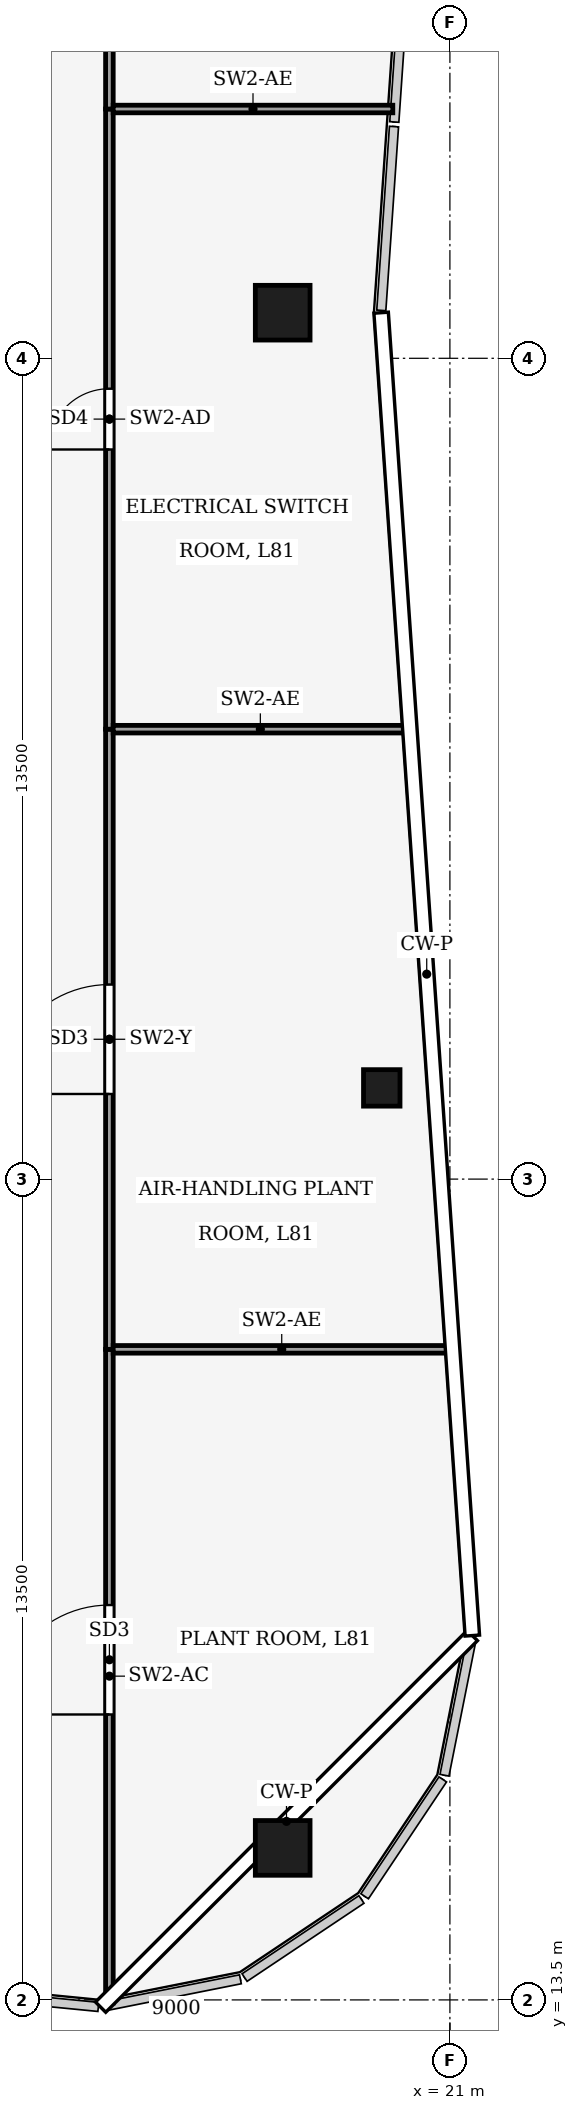
"""IFC4 building model, lengths in metres.
Left out: names, types, materials, properties, quantities, classifications, styles, units other than length and angle.
Written with IfcOpenShell. Run it as: python <this file> out.ifc"""

import sys

from ifc_helpers import new_model, si_unit, direction, frame, frame_2d, origin, origin_2d, place, context, subcontext, project, spatial, rectangle, hollow_rectangle, extrude, element, fill, save


model = new_model("IFC4")
c1 = context("Model", 3, precision=1e-05, world=origin(), true_north=direction((0.0, 1.0)))
c2 = subcontext(c1, "Body", "Model", "MODEL_VIEW")
j1 = project(units=[si_unit("LENGTHUNIT", "METRE"), si_unit("PLANEANGLEUNIT", "RADIAN")], contexts=[c1])
p1 = place(None, origin())
s1 = spatial("IfcSite", under=j1, at=p1, CompositionType="ELEMENT")
p2 = place(p1, origin())
s2 = spatial("IfcBuilding", under=s1, at=p2, CompositionType="ELEMENT")
p3 = place(p2, frame((0.0, 0.0, 359.5)))
s3 = spatial("IfcBuildingStorey", under=s2, at=p3, CompositionType="ELEMENT", Elevation=359.5)
for number, where, z_axis, x_axis in (
    (1, (18.25, 41.25, 0.0), (0.0, 0.0, 1.0), (1.0, 0.0, 0.0)),
    (2, (18.25, 16.0, 0.0), (0.0, 0.0, 1.0), (1.0, 0.0, 0.0)),
):
    element("IfcColumn", number, at=place(p3, frame(where, z_axis=z_axis, x_axis=x_axis)), inside=s3, PredefinedType="COLUMN", context=c2, shape_type="SweptSolid", body=[
        extrude(hollow_rectangle(XDim=0.9, YDim=0.9, WallThickness=0.04, at=origin_2d()), origin(), (0.0, 0.0, 1.0), 4.5),
    ])
p4 = place(p3, frame((19.879, 28.5, 0.0), z_axis=(0.0, 0.0, 1.0), x_axis=(1.0, 0.0, 0.0)))
e3 = element("IfcColumn", 3, at=p4, inside=s3, PredefinedType="COLUMN", context=c2, shape_type="SweptSolid", body=[
    extrude(hollow_rectangle(XDim=0.6, YDim=0.6, WallThickness=0.025, at=origin_2d()), origin(), (0.0, 0.0, 1.0), 4.5),
])
p5 = place(p3, frame((15.4, 13.45, 0.0), z_axis=(0.0, 0.0, 1.0), x_axis=(0.0, 1.0, 0.0)))
e4 = element("IfcWall", 4, at=p5, inside=s3, PredefinedType="PARTITIONING", context=c2, shape_type="SweptSolid", body=[
    extrude(rectangle(XDim=10.75, YDim=0.125, at=frame_2d((5.375, 0.0))), origin(), (0.0, 0.0, 1.0), 3.312),
])
p6 = place(p5, frame((4.745, 0.0, 0.0)))
e5 = element("IfcOpeningElement", 5, at=p6, cuts=e4, PredefinedType="OPENING", context=c2, shape_type="SweptSolid", body=[
    extrude(rectangle(XDim=1.8, YDim=2.4, at=frame_2d((0.9, 1.2))), frame((0.0, 0.073, 0.0), z_axis=(0.0, -1.0, 0.0), x_axis=(1.0, 0.0, 0.0)), (0.0, 0.0, 1.0), 0.145),
])
p7 = place(p3, frame((15.4, 24.2, 0.0), z_axis=(0.0, 0.0, 1.0), x_axis=(0.0, 1.0, 0.0)))
e6 = element("IfcWall", 6, at=p7, inside=s3, PredefinedType="PARTITIONING", context=c2, shape_type="SweptSolid", body=[
    extrude(rectangle(XDim=10.2, YDim=0.125, at=frame_2d((5.1, 0.0))), origin(), (0.0, 0.0, 1.0), 4.02),
])
p8 = place(p7, frame((4.2, 0.0, 0.0)))
e7 = element("IfcOpeningElement", 7, at=p8, cuts=e6, PredefinedType="OPENING", context=c2, shape_type="SweptSolid", body=[
    extrude(rectangle(XDim=1.8, YDim=2.4, at=frame_2d((0.9, 1.2))), frame((0.0, 0.073, 0.0), z_axis=(0.0, -1.0, 0.0), x_axis=(1.0, 0.0, 0.0)), (0.0, 0.0, 1.0), 0.145),
])
p9 = place(p3, frame((15.4, 34.4, 0.0), z_axis=(0.0, 0.0, 1.0), x_axis=(0.0, 1.0, 0.0)))
e8 = element("IfcWall", 8, at=p9, inside=s3, PredefinedType="PARTITIONING", context=c2, shape_type="SweptSolid", body=[
    extrude(rectangle(XDim=10.2, YDim=0.125, at=frame_2d((5.1, 0.0))), origin(), (0.0, 0.0, 1.0), 3.62),
])
p10 = place(p9, frame((4.6, 0.0, 0.0)))
e9 = element("IfcOpeningElement", 9, at=p10, cuts=e8, PredefinedType="OPENING", context=c2, shape_type="SweptSolid", body=[
    extrude(rectangle(XDim=1.0, YDim=2.1, at=frame_2d((0.5, 1.05))), frame((0.0, 0.073, 0.0), z_axis=(0.0, -1.0, 0.0), x_axis=(1.0, 0.0, 0.0)), (0.0, 0.0, 1.0), 0.145),
])
p11 = place(p3, frame((15.4, 54.738, 0.0), z_axis=(0.0, 0.0, 1.0), x_axis=(0.0, -1.0, 0.0)))
e10 = element("IfcWall", 10, at=p11, inside=s3, PredefinedType="PARTITIONING", context=c2, shape_type="SweptSolid", body=[
    extrude(rectangle(XDim=10.137, YDim=0.125, at=frame_2d((5.069, 0.0))), origin(), (0.0, 0.0, 1.0), 3.83),
])
p12 = place(p3, frame((15.462, 24.2, 0.0), z_axis=(0.0, 0.0, 1.0), x_axis=(1.0, 0.0, 0.0)))
e11 = element("IfcWall", 11, at=p12, inside=s3, PredefinedType="PARTITIONING", context=c2, shape_type="SweptSolid", body=[
    extrude(rectangle(XDim=5.543, YDim=0.125, at=frame_2d((2.772, 0.0))), origin(), (0.0, 0.0, 1.0), 3.52),
])
p13 = place(p3, frame((15.462, 34.4, 0.0), z_axis=(0.0, 0.0, 1.0), x_axis=(1.0, 0.0, 0.0)))
e12 = element("IfcWall", 12, at=p13, inside=s3, PredefinedType="PARTITIONING", context=c2, shape_type="SweptSolid", body=[
    extrude(rectangle(XDim=4.84, YDim=0.125, at=frame_2d((2.42, 0.0))), origin(), (0.0, 0.0, 1.0), 3.52),
])
p14 = place(p3, frame((15.462, 44.6, 0.0), z_axis=(0.0, 0.0, 1.0), x_axis=(1.0, 0.0, 0.0)))
e13 = element("IfcWall", 13, at=p14, inside=s3, PredefinedType="PARTITIONING", context=c2, shape_type="SweptSolid", body=[
    extrude(rectangle(XDim=4.599, YDim=0.125, at=frame_2d((2.299, 0.0))), origin(), (0.0, 0.0, 1.0), 3.52),
])
p15 = place(p6, origin())
e14 = element("IfcDoor", 14, at=p15, inside=s3, OperationType="DOUBLE_DOOR_SINGLE_SWING", PredefinedType="DOOR", context=c2, shape_type="SweptSolid", body=[
    extrude(rectangle(XDim=1.8, YDim=2.4, at=frame_2d((0.9, 1.2))), frame((0.0, 0.025, 0.0), z_axis=(0.0, -1.0, 0.0), x_axis=(1.0, 0.0, 0.0)), (0.0, 0.0, 1.0), 0.05),
])
fill(e5, e14)
p16 = place(p8, origin())
e15 = element("IfcDoor", 15, at=p16, inside=s3, OperationType="DOUBLE_DOOR_SINGLE_SWING", PredefinedType="DOOR", context=c2, shape_type="SweptSolid", body=[
    extrude(rectangle(XDim=1.8, YDim=2.4, at=frame_2d((0.9, 1.2))), frame((0.0, 0.025, 0.0), z_axis=(0.0, -1.0, 0.0), x_axis=(1.0, 0.0, 0.0)), (0.0, 0.0, 1.0), 0.05),
])
fill(e7, e15)
p17 = place(p10, origin())
e16 = element("IfcDoor", 16, at=p17, inside=s3, OperationType="SINGLE_SWING_RIGHT", PredefinedType="DOOR", context=c2, shape_type="SweptSolid", body=[
    extrude(rectangle(XDim=1.0, YDim=2.1, at=frame_2d((0.5, 1.05))), frame((0.0, 0.025, 0.0), z_axis=(0.0, -1.0, 0.0), x_axis=(1.0, 0.0, 0.0)), (0.0, 0.0, 1.0), 0.05),
])
fill(e9, e16)
save(model, sys.argv[1])
